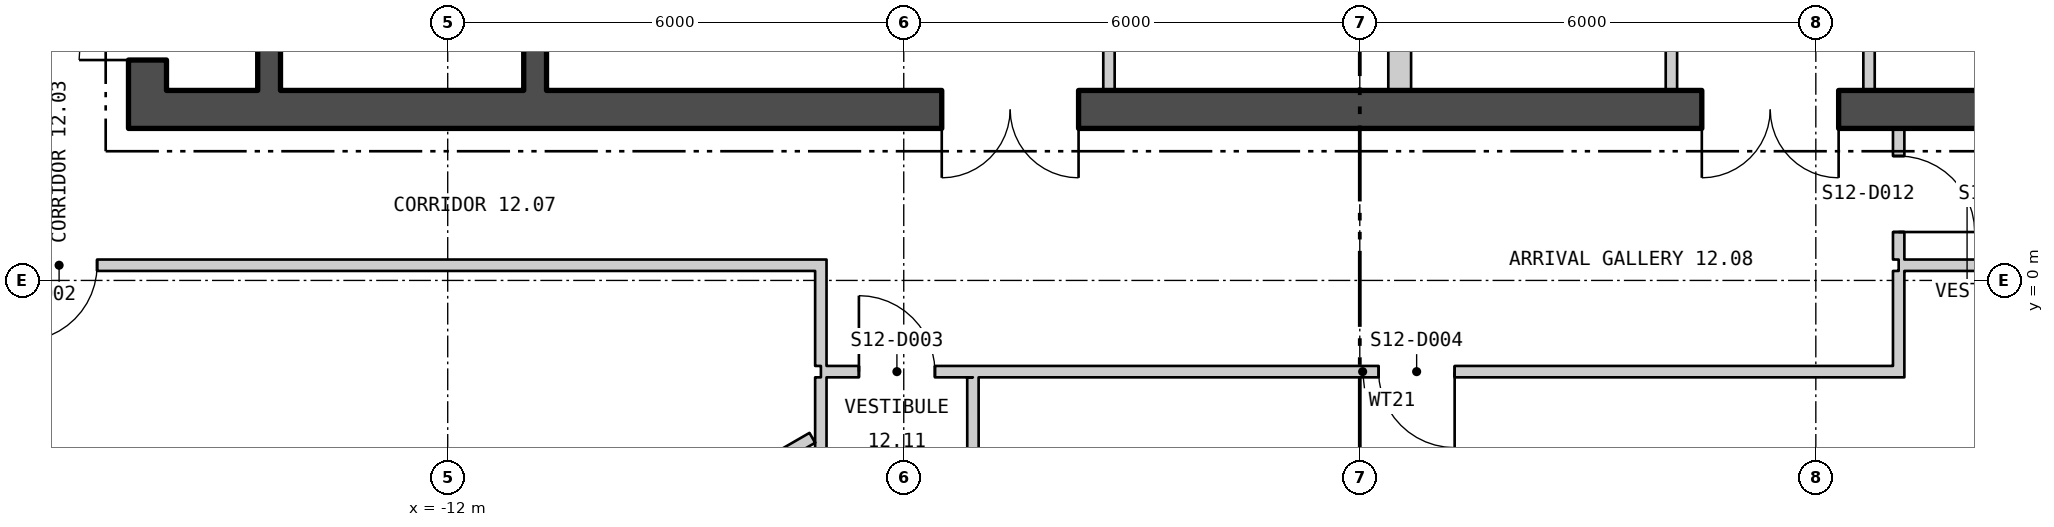
"""IFC4 building model, lengths in metres.
Left out: names, types, materials, properties, quantities, classifications, styles, units other than length and angle.
Written with IfcOpenShell. Run it as: python <this file> out.ifc"""

import sys

from ifc_helpers import new_model, si_unit, direction, frame, frame_2d, origin, place, context, subcontext, project, spatial, polyline, rectangle, outline, extrude, element, fill, save


model = new_model("IFC4")
c1 = context("Model", 3, precision=1e-05, world=origin(), true_north=direction((0.0, 1.0)))
c2 = subcontext(c1, "Body", "Model", "MODEL_VIEW")
j1 = project(units=[si_unit("LENGTHUNIT", "METRE"), si_unit("PLANEANGLEUNIT", "RADIAN")], contexts=[c1])
p1 = place(None, origin())
s1 = spatial("IfcSite", under=j1, at=p1, CompositionType="ELEMENT")
p2 = place(p1, origin())
s2 = spatial("IfcBuilding", under=s1, at=p2, CompositionType="ELEMENT")
p3 = place(p2, frame((0.0, 0.0, 163.2)))
s3 = spatial("IfcBuildingStorey", under=s2, at=p3, CompositionType="ELEMENT", Elevation=163.2)
p4 = place(p3, frame((-26.925, 12.951, -0.18), z_axis=(0.0, 0.0, 1.0), x_axis=(0.499999764979, -0.866025539474, 0.0)))
e1 = element("IfcWall", 1, at=p4, inside=s3, PredefinedType="SOLIDWALL", context=c2, shape_type="SweptSolid", body=[
    extrude(outline(polyline([(-0.13, -0.225), (45.87, -0.225), (45.61, 0.225), (0.13, 0.225), (-0.13, -0.225)])), origin(), (0.0, 0.0, 1.0), 3.68),
])
p5 = place(p4, frame((1.424, 0.0, 1.08)))
e2 = element("IfcOpeningElement", 2, at=p5, cuts=e1, PredefinedType="OPENING", context=c2, shape_type="SweptSolid", body=[
    extrude(rectangle(XDim=2.4, YDim=2.0, at=frame_2d((1.2, 1.0))), frame((0.0, 0.235, 0.0), z_axis=(0.0, -1.0, 0.0), x_axis=(1.0, 0.0, 0.0)), (0.0, 0.0, 1.0), 0.47),
])
p6 = place(p4, frame((5.893, 0.0, 1.08)))
e3 = element("IfcOpeningElement", 3, at=p6, cuts=e1, PredefinedType="OPENING", context=c2, shape_type="SweptSolid", body=[
    extrude(rectangle(XDim=2.4, YDim=2.0, at=frame_2d((1.2, 1.0))), frame((0.0, 0.235, 0.0), z_axis=(0.0, -1.0, 0.0), x_axis=(1.0, 0.0, 0.0)), (0.0, 0.0, 1.0), 0.47),
])
p7 = place(p4, frame((10.401, 0.0, 1.08)))
e4 = element("IfcOpeningElement", 4, at=p7, cuts=e1, PredefinedType="OPENING", context=c2, shape_type="SweptSolid", body=[
    extrude(rectangle(XDim=2.4, YDim=2.0, at=frame_2d((1.2, 1.0))), frame((0.0, 0.235, 0.0), z_axis=(0.0, -1.0, 0.0), x_axis=(1.0, 0.0, 0.0)), (0.0, 0.0, 1.0), 0.47),
])
p8 = place(p4, frame((14.909, 0.0, 1.08)))
e5 = element("IfcOpeningElement", 5, at=p8, cuts=e1, PredefinedType="OPENING", context=c2, shape_type="SweptSolid", body=[
    extrude(rectangle(XDim=2.4, YDim=2.0, at=frame_2d((1.2, 1.0))), frame((0.0, 0.235, 0.0), z_axis=(0.0, -1.0, 0.0), x_axis=(1.0, 0.0, 0.0)), (0.0, 0.0, 1.0), 0.47),
])
p9 = place(p4, frame((19.416, 0.0, 1.08)))
e6 = element("IfcOpeningElement", 6, at=p9, cuts=e1, PredefinedType="OPENING", context=c2, shape_type="SweptSolid", body=[
    extrude(rectangle(XDim=2.4, YDim=2.0, at=frame_2d((1.2, 1.0))), frame((0.0, 0.235, 0.0), z_axis=(0.0, -1.0, 0.0), x_axis=(1.0, 0.0, 0.0)), (0.0, 0.0, 1.0), 0.47),
])
p10 = place(p4, frame((23.924, 0.0, 1.08)))
e7 = element("IfcOpeningElement", 7, at=p10, cuts=e1, PredefinedType="OPENING", context=c2, shape_type="SweptSolid", body=[
    extrude(rectangle(XDim=2.4, YDim=2.0, at=frame_2d((1.2, 1.0))), frame((0.0, 0.235, 0.0), z_axis=(0.0, -1.0, 0.0), x_axis=(1.0, 0.0, 0.0)), (0.0, 0.0, 1.0), 0.47),
])
p11 = place(p4, frame((28.431, 0.0, 1.08)))
e8 = element("IfcOpeningElement", 8, at=p11, cuts=e1, PredefinedType="OPENING", context=c2, shape_type="SweptSolid", body=[
    extrude(rectangle(XDim=2.4, YDim=2.0, at=frame_2d((1.2, 1.0))), frame((0.0, 0.235, 0.0), z_axis=(0.0, -1.0, 0.0), x_axis=(1.0, 0.0, 0.0)), (0.0, 0.0, 1.0), 0.47),
])
p12 = place(p4, frame((32.939, 0.0, 1.08)))
e9 = element("IfcOpeningElement", 9, at=p12, cuts=e1, PredefinedType="OPENING", context=c2, shape_type="SweptSolid", body=[
    extrude(rectangle(XDim=2.4, YDim=2.0, at=frame_2d((1.2, 1.0))), frame((0.0, 0.235, 0.0), z_axis=(0.0, -1.0, 0.0), x_axis=(1.0, 0.0, 0.0)), (0.0, 0.0, 1.0), 0.47),
])
p13 = place(p4, frame((37.447, 0.0, 1.08)))
e10 = element("IfcOpeningElement", 10, at=p13, cuts=e1, PredefinedType="OPENING", context=c2, shape_type="SweptSolid", body=[
    extrude(rectangle(XDim=2.4, YDim=2.0, at=frame_2d((1.2, 1.0))), frame((0.0, 0.235, 0.0), z_axis=(0.0, -1.0, 0.0), x_axis=(1.0, 0.0, 0.0)), (0.0, 0.0, 1.0), 0.47),
])
p14 = place(p4, frame((41.916, 0.0, 1.08)))
e11 = element("IfcOpeningElement", 11, at=p14, cuts=e1, PredefinedType="OPENING", context=c2, shape_type="SweptSolid", body=[
    extrude(rectangle(XDim=2.4, YDim=2.0, at=frame_2d((1.2, 1.0))), frame((0.0, 0.235, 0.0), z_axis=(0.0, -1.0, 0.0), x_axis=(1.0, 0.0, 0.0)), (0.0, 0.0, 1.0), 0.47),
])
p15 = place(p3, frame((4.055, -26.661, -0.18), z_axis=(0.0, 0.0, 1.0), x_axis=(0.499999764979, 0.866025539474, 0.0)))
e12 = element("IfcWall", 12, at=p15, inside=s3, PredefinedType="SOLIDWALL", context=c2, shape_type="SweptSolid", body=[
    extrude(outline(polyline([(-0.13, -0.225), (45.87, -0.225), (45.61, 0.225), (0.13, 0.225), (-0.13, -0.225)])), origin(), (0.0, 0.0, 1.0), 3.68),
])
p16 = place(p15, frame((1.424, 0.0, 1.08)))
e13 = element("IfcOpeningElement", 13, at=p16, cuts=e12, PredefinedType="OPENING", context=c2, shape_type="SweptSolid", body=[
    extrude(rectangle(XDim=2.4, YDim=2.0, at=frame_2d((1.2, 1.0))), frame((0.0, 0.235, 0.0), z_axis=(0.0, -1.0, 0.0), x_axis=(1.0, 0.0, 0.0)), (0.0, 0.0, 1.0), 0.47),
])
p17 = place(p15, frame((5.893, 0.0, 1.08)))
e14 = element("IfcOpeningElement", 14, at=p17, cuts=e12, PredefinedType="OPENING", context=c2, shape_type="SweptSolid", body=[
    extrude(rectangle(XDim=2.4, YDim=2.0, at=frame_2d((1.2, 1.0))), frame((0.0, 0.235, 0.0), z_axis=(0.0, -1.0, 0.0), x_axis=(1.0, 0.0, 0.0)), (0.0, 0.0, 1.0), 0.47),
])
p18 = place(p15, frame((10.401, 0.0, 1.08)))
e15 = element("IfcOpeningElement", 15, at=p18, cuts=e12, PredefinedType="OPENING", context=c2, shape_type="SweptSolid", body=[
    extrude(rectangle(XDim=2.4, YDim=2.0, at=frame_2d((1.2, 1.0))), frame((0.0, 0.235, 0.0), z_axis=(0.0, -1.0, 0.0), x_axis=(1.0, 0.0, 0.0)), (0.0, 0.0, 1.0), 0.47),
])
p19 = place(p15, frame((14.909, 0.0, 1.08)))
e16 = element("IfcOpeningElement", 16, at=p19, cuts=e12, PredefinedType="OPENING", context=c2, shape_type="SweptSolid", body=[
    extrude(rectangle(XDim=2.4, YDim=2.0, at=frame_2d((1.2, 1.0))), frame((0.0, 0.235, 0.0), z_axis=(0.0, -1.0, 0.0), x_axis=(1.0, 0.0, 0.0)), (0.0, 0.0, 1.0), 0.47),
])
p20 = place(p15, frame((19.416, 0.0, 1.08)))
e17 = element("IfcOpeningElement", 17, at=p20, cuts=e12, PredefinedType="OPENING", context=c2, shape_type="SweptSolid", body=[
    extrude(rectangle(XDim=2.4, YDim=2.0, at=frame_2d((1.2, 1.0))), frame((0.0, 0.235, 0.0), z_axis=(0.0, -1.0, 0.0), x_axis=(1.0, 0.0, 0.0)), (0.0, 0.0, 1.0), 0.47),
])
p21 = place(p15, frame((23.924, 0.0, 1.08)))
e18 = element("IfcOpeningElement", 18, at=p21, cuts=e12, PredefinedType="OPENING", context=c2, shape_type="SweptSolid", body=[
    extrude(rectangle(XDim=2.4, YDim=2.0, at=frame_2d((1.2, 1.0))), frame((0.0, 0.235, 0.0), z_axis=(0.0, -1.0, 0.0), x_axis=(1.0, 0.0, 0.0)), (0.0, 0.0, 1.0), 0.47),
])
p22 = place(p15, frame((28.431, 0.0, 1.08)))
e19 = element("IfcOpeningElement", 19, at=p22, cuts=e12, PredefinedType="OPENING", context=c2, shape_type="SweptSolid", body=[
    extrude(rectangle(XDim=2.4, YDim=2.0, at=frame_2d((1.2, 1.0))), frame((0.0, 0.235, 0.0), z_axis=(0.0, -1.0, 0.0), x_axis=(1.0, 0.0, 0.0)), (0.0, 0.0, 1.0), 0.47),
])
p23 = place(p15, frame((32.939, 0.0, 1.08)))
e20 = element("IfcOpeningElement", 20, at=p23, cuts=e12, PredefinedType="OPENING", context=c2, shape_type="SweptSolid", body=[
    extrude(rectangle(XDim=2.4, YDim=2.0, at=frame_2d((1.2, 1.0))), frame((0.0, 0.235, 0.0), z_axis=(0.0, -1.0, 0.0), x_axis=(1.0, 0.0, 0.0)), (0.0, 0.0, 1.0), 0.47),
])
p24 = place(p15, frame((37.447, 0.0, 1.08)))
e21 = element("IfcOpeningElement", 21, at=p24, cuts=e12, PredefinedType="OPENING", context=c2, shape_type="SweptSolid", body=[
    extrude(rectangle(XDim=2.4, YDim=2.0, at=frame_2d((1.2, 1.0))), frame((0.0, 0.235, 0.0), z_axis=(0.0, -1.0, 0.0), x_axis=(1.0, 0.0, 0.0)), (0.0, 0.0, 1.0), 0.47),
])
p25 = place(p15, frame((41.916, 0.0, 1.08)))
e22 = element("IfcOpeningElement", 22, at=p25, cuts=e12, PredefinedType="OPENING", context=c2, shape_type="SweptSolid", body=[
    extrude(rectangle(XDim=2.4, YDim=2.0, at=frame_2d((1.2, 1.0))), frame((0.0, 0.235, 0.0), z_axis=(0.0, -1.0, 0.0), x_axis=(1.0, 0.0, 0.0)), (0.0, 0.0, 1.0), 0.47),
])
p26 = place(p3, frame((-16.2, 2.25, 0.0), z_axis=(0.0, 0.0, 1.0), x_axis=(1.0, 0.0, 0.0)))
e23 = element("IfcWall", 23, at=p26, inside=s3, PredefinedType="SHEAR", context=c2, shape_type="SweptSolid", body=[
    extrude(rectangle(XDim=32.4, YDim=0.5, at=frame_2d((16.2, 0.0))), origin(), (0.0, 0.0, 1.0), 3.7),
])
p27 = place(p26, frame((10.7, 0.0, 0.0)))
e24 = element("IfcOpeningElement", 24, at=p27, cuts=e23, PredefinedType="OPENING", context=c2, shape_type="SweptSolid", body=[
    extrude(rectangle(XDim=1.8, YDim=2.4, at=frame_2d((0.9, 1.2))), frame((0.0, 0.26, 0.0), z_axis=(0.0, -1.0, 0.0), x_axis=(1.0, 0.0, 0.0)), (0.0, 0.0, 1.0), 0.52),
])
p28 = place(p26, frame((20.7, 0.0, 0.0)))
e25 = element("IfcOpeningElement", 25, at=p28, cuts=e23, PredefinedType="OPENING", context=c2, shape_type="SweptSolid", body=[
    extrude(rectangle(XDim=1.8, YDim=2.4, at=frame_2d((0.9, 1.2))), frame((0.0, 0.26, 0.0), z_axis=(0.0, -1.0, 0.0), x_axis=(1.0, 0.0, 0.0)), (0.0, 0.0, 1.0), 0.52),
])
p29 = place(p3, frame((-15.95, 2.5, 0.0), z_axis=(0.0, 0.0, 1.0), x_axis=(0.0, 1.0, 0.0)))
e26 = element("IfcWall", 26, at=p29, inside=s3, PredefinedType="SHEAR", context=c2, shape_type="SweptSolid", body=[
    extrude(rectangle(XDim=15.0, YDim=0.5, at=frame_2d((7.5, 0.0))), origin(), (0.0, 0.0, 1.0), 3.7),
])
p30 = place(p29, frame((4.35, 0.0, 0.0)))
e27 = element("IfcOpeningElement", 27, at=p30, cuts=e26, PredefinedType="OPENING", context=c2, shape_type="SweptSolid", body=[
    extrude(rectangle(XDim=1.5, YDim=2.1, at=frame_2d((0.75, 1.05))), frame((0.0, 0.26, 0.0), z_axis=(0.0, -1.0, 0.0), x_axis=(1.0, 0.0, 0.0)), (0.0, 0.0, 1.0), 0.52),
])
p31 = place(p29, frame((0.4, 0.0, 0.0)))
e28 = element("IfcOpeningElement", 28, at=p31, cuts=e26, PredefinedType="OPENING", context=c2, shape_type="SweptSolid", body=[
    extrude(rectangle(XDim=0.9, YDim=2.1, at=frame_2d((0.45, 1.05))), frame((0.0, 0.26, 0.0), z_axis=(0.0, -1.0, 0.0), x_axis=(1.0, 0.0, 0.0)), (0.0, 0.0, 1.0), 0.52),
])
p32 = place(p29, frame((2.491, 0.0, 0.0)))
e29 = element("IfcOpeningElement", 29, at=p32, cuts=e26, PredefinedType="OPENING", context=c2, shape_type="SweptSolid", body=[
    extrude(rectangle(XDim=0.9, YDim=2.1, at=frame_2d((0.45, 1.05))), frame((0.0, 0.26, 0.0), z_axis=(0.0, -1.0, 0.0), x_axis=(1.0, 0.0, 0.0)), (0.0, 0.0, 1.0), 0.52),
])
p33 = place(p29, frame((7.996, 0.0, 0.0)))
e30 = element("IfcOpeningElement", 30, at=p33, cuts=e26, PredefinedType="OPENING", context=c2, shape_type="SweptSolid", body=[
    extrude(rectangle(XDim=1.0, YDim=2.1, at=frame_2d((0.5, 1.05))), frame((0.0, 0.26, 0.0), z_axis=(0.0, -1.0, 0.0), x_axis=(1.0, 0.0, 0.0)), (0.0, 0.0, 1.0), 0.52),
])
p34 = place(p29, frame((12.621, 0.0, 0.0)))
e31 = element("IfcOpeningElement", 31, at=p34, cuts=e26, PredefinedType="OPENING", context=c2, shape_type="SweptSolid", body=[
    extrude(rectangle(XDim=0.9, YDim=2.1, at=frame_2d((0.45, 1.05))), frame((0.0, 0.26, 0.0), z_axis=(0.0, -1.0, 0.0), x_axis=(1.0, 0.0, 0.0)), (0.0, 0.0, 1.0), 0.52),
])
p35 = place(p3, frame((-10.85, 2.5, 0.0), z_axis=(0.0, 0.0, 1.0), x_axis=(0.0, 1.0, 0.0)))
e32 = element("IfcWall", 32, at=p35, inside=s3, PredefinedType="SHEAR", context=c2, shape_type="SweptSolid", body=[
    extrude(rectangle(XDim=15.0, YDim=0.3, at=frame_2d((7.5, 0.0))), origin(), (0.0, 0.0, 1.0), 3.7),
])
p36 = place(p35, frame((3.475, 0.0, 0.0)))
e33 = element("IfcOpeningElement", 33, at=p36, cuts=e32, PredefinedType="OPENING", context=c2, shape_type="SweptSolid", body=[
    extrude(rectangle(XDim=1.25, YDim=2.1, at=frame_2d((0.625, 1.05))), frame((0.0, 0.16, 0.0), z_axis=(0.0, -1.0, 0.0), x_axis=(1.0, 0.0, 0.0)), (0.0, 0.0, 1.0), 0.32),
])
p37 = place(p35, frame((1.125, 0.0, 0.0)))
e34 = element("IfcOpeningElement", 34, at=p37, cuts=e32, PredefinedType="OPENING", context=c2, shape_type="SweptSolid", body=[
    extrude(rectangle(XDim=1.0, YDim=2.1, at=frame_2d((0.5, 1.05))), frame((0.0, 0.16, 0.0), z_axis=(0.0, -1.0, 0.0), x_axis=(1.0, 0.0, 0.0)), (0.0, 0.0, 1.0), 0.32),
])
p38 = place(p3, frame((-14.35, 2.5, 0.0), z_axis=(0.0, 0.0, 1.0), x_axis=(0.0, 1.0, 0.0)))
e35 = element("IfcWall", 35, at=p38, inside=s3, PredefinedType="SHEAR", context=c2, shape_type="SweptSolid", body=[
    extrude(rectangle(XDim=15.0, YDim=0.3, at=frame_2d((7.5, 0.0))), origin(), (0.0, 0.0, 1.0), 3.7),
])
p39 = place(p38, frame((4.35, 0.0, 0.0)))
e36 = element("IfcOpeningElement", 36, at=p39, cuts=e35, PredefinedType="OPENING", context=c2, shape_type="SweptSolid", body=[
    extrude(rectangle(XDim=1.5, YDim=2.1, at=frame_2d((0.75, 1.05))), frame((0.0, 0.16, 0.0), z_axis=(0.0, -1.0, 0.0), x_axis=(1.0, 0.0, 0.0)), (0.0, 0.0, 1.0), 0.32),
])
for number, where, z_axis, x_axis in (
    (37, (-3.3, 2.5, 0.0), (0.0, 0.0, 1.0), (0.0, 1.0, 0.0)),
    (38, (0.45, 2.5, 0.0), (0.0, 0.0, 1.0), (0.0, 1.0, 0.0)),
    (39, (0.6, 2.5, 0.0), (0.0, 0.0, 1.0), (0.0, 1.0, 0.0)),
    (40, (4.1, 2.5, 0.0), (0.0, 0.0, 1.0), (0.0, 1.0, 0.0)),
    (41, (6.7, 2.5, 0.0), (0.0, 0.0, 1.0), (0.0, 1.0, 0.0)),
):
    element("IfcWall", number, at=place(p3, frame(where, z_axis=z_axis, x_axis=x_axis)), inside=s3, PredefinedType="PARTITIONING", context=c2, shape_type="SweptSolid", body=[
        extrude(rectangle(XDim=3.575, YDim=0.15, at=frame_2d((1.788, 0.0))), origin(), (0.0, 0.0, 1.0), 3.7),
    ])
p40 = place(p3, frame((-17.925, 0.2, 0.0), z_axis=(0.0, 0.0, 1.0), x_axis=(1.0, 0.0, 0.0)))
e42 = element("IfcWall", 42, at=p40, inside=s3, PredefinedType="PARTITIONING", context=c2, shape_type="SweptSolid", body=[
    extrude(rectangle(XDim=10.759, YDim=0.15, at=frame_2d((5.38, 0.0))), origin(), (0.0, 0.0, 1.0), 3.7),
])
p41 = place(p40, frame((0.312, 0.0, 0.0)))
e43 = element("IfcOpeningElement", 43, at=p41, cuts=e42, PredefinedType="OPENING", context=c2, shape_type="SweptSolid", body=[
    extrude(rectangle(XDim=1.0, YDim=2.1, at=frame_2d((0.5, 1.05))), frame((0.0, 0.085, 0.0), z_axis=(0.0, -1.0, 0.0), x_axis=(1.0, 0.0, 0.0)), (0.0, 0.0, 1.0), 0.17),
])
p42 = place(p3, frame((-14.906, -6.516, 0.0), z_axis=(0.0, 0.0, 1.0), x_axis=(0.866138783521, 0.499803569096, 0.0)))
e44 = element("IfcWall", 44, at=p42, inside=s3, PredefinedType="PARTITIONING", context=c2, shape_type="SweptSolid", body=[
    extrude(rectangle(XDim=8.893, YDim=0.15, at=frame_2d((4.447, 0.0))), origin(), (0.0, 0.0, 1.0), 3.7),
])
p43 = place(p3, frame((-7.091, -1.125, 0.0), z_axis=(0.0, 0.0, 1.0), x_axis=(0.0, 1.0, 0.0)))
e45 = element("IfcWall", 45, at=p43, inside=s3, PredefinedType="PARTITIONING", context=c2, shape_type="SweptSolid", body=[
    extrude(rectangle(XDim=1.4, YDim=0.15, at=frame_2d((0.7, 0.0))), origin(), (0.0, 0.0, 1.0), 3.7),
])
p44 = place(p3, frame((-7.09, -1.2, 0.0), z_axis=(0.0, 0.0, 1.0), x_axis=(1.0, 0.0, 0.0)))
e46 = element("IfcWall", 46, at=p44, inside=s3, PredefinedType="PARTITIONING", context=c2, shape_type="SweptSolid", body=[
    extrude(rectangle(XDim=14.255, YDim=0.15, at=frame_2d((7.128, 0.0))), origin(), (0.0, 0.0, 1.0), 3.7),
])
p45 = place(p44, frame((0.5, 0.0, 0.0)))
e47 = element("IfcOpeningElement", 47, at=p45, cuts=e46, PredefinedType="OPENING", context=c2, shape_type="SweptSolid", body=[
    extrude(rectangle(XDim=1.0, YDim=2.1, at=frame_2d((0.5, 1.05))), frame((0.0, 0.085, 0.0), z_axis=(0.0, -1.0, 0.0), x_axis=(1.0, 0.0, 0.0)), (0.0, 0.0, 1.0), 0.17),
])
p46 = place(p44, frame((7.338, 0.0, 0.0)))
e48 = element("IfcOpeningElement", 48, at=p46, cuts=e46, PredefinedType="OPENING", context=c2, shape_type="SweptSolid", body=[
    extrude(rectangle(XDim=1.0, YDim=2.1, at=frame_2d((0.5, 1.05))), frame((0.0, 0.085, 0.0), z_axis=(0.0, -1.0, 0.0), x_axis=(1.0, 0.0, 0.0)), (0.0, 0.0, 1.0), 0.17),
])
p47 = place(p3, frame((-7.091, -3.46, 0.0), z_axis=(0.0, 0.0, 1.0), x_axis=(-9.153318e-05, 0.999999995811, 0.0)))
e49 = element("IfcWall", 49, at=p47, inside=s3, PredefinedType="PARTITIONING", context=c2, shape_type="SweptSolid", body=[
    extrude(rectangle(XDim=2.185, YDim=0.15, at=frame_2d((1.093, 0.0))), origin(), (0.0, 0.0, 1.0), 3.7),
])
p48 = place(p3, frame((-5.089, -3.48, 0.0), z_axis=(0.0, 0.0, 1.0), x_axis=(-0.000453514693, 0.999999897162, 0.0)))
e50 = element("IfcWall", 50, at=p48, inside=s3, PredefinedType="PARTITIONING", context=c2, shape_type="SweptSolid", body=[
    extrude(rectangle(XDim=2.205, YDim=0.15, at=frame_2d((1.103, 0.0))), origin(), (0.0, 0.0, 1.0), 3.7),
])
p49 = place(p3, frame((7.09, -1.125, 0.0), z_axis=(0.0, 0.0, 1.0), x_axis=(0.0, 1.0, 0.0)))
e51 = element("IfcWall", 51, at=p49, inside=s3, PredefinedType="PARTITIONING", context=c2, shape_type="SweptSolid", body=[
    extrude(rectangle(XDim=1.25, YDim=0.15, at=frame_2d((0.625, 0.0))), origin(), (0.0, 0.0, 1.0), 3.7),
])
p50 = place(p3, frame((7.09, 0.2, 0.0), z_axis=(0.0, 0.0, 1.0), x_axis=(1.0, 0.0, 0.0)))
e52 = element("IfcWall", 52, at=p50, inside=s3, PredefinedType="PARTITIONING", context=c2, shape_type="SweptSolid", body=[
    extrude(rectangle(XDim=10.835, YDim=0.15, at=frame_2d((5.418, 0.0))), origin(), (0.0, 0.0, 1.0), 3.7),
])
p51 = place(p3, frame((7.09, 0.275, 0.0), z_axis=(0.0, 0.0, 1.0), x_axis=(0.0, 1.0, 0.0)))
e53 = element("IfcWall", 53, at=p51, inside=s3, PredefinedType="PARTITIONING", context=c2, shape_type="SweptSolid", body=[
    extrude(rectangle(XDim=1.725, YDim=0.15, at=frame_2d((0.863, 0.0))), origin(), (0.0, 0.0, 1.0), 3.7),
])
p52 = place(p51, frame((0.362, 0.0, 0.0)))
e54 = element("IfcOpeningElement", 54, at=p52, cuts=e53, PredefinedType="OPENING", context=c2, shape_type="SweptSolid", body=[
    extrude(rectangle(XDim=1.0, YDim=2.1, at=frame_2d((0.5, 1.05))), frame((0.0, 0.085, 0.0), z_axis=(0.0, -1.0, 0.0), x_axis=(1.0, 0.0, 0.0)), (0.0, 0.0, 1.0), 0.17),
])
p53 = place(p31, origin())
e55 = element("IfcDoor", 55, at=p53, inside=s3, OperationType="SINGLE_SWING_RIGHT", PredefinedType="DOOR", context=c2, shape_type="SweptSolid", body=[
    extrude(rectangle(XDim=0.9, YDim=2.1, at=frame_2d((0.45, 1.05))), frame((0.0, 0.025, 0.0), z_axis=(0.0, -1.0, 0.0), x_axis=(1.0, 0.0, 0.0)), (0.0, 0.0, 1.0), 0.05),
])
fill(e28, e55)
p54 = place(p27, origin())
e56 = element("IfcDoor", 56, at=p54, inside=s3, OperationType="DOUBLE_DOOR_SINGLE_SWING", PredefinedType="DOOR", context=c2, shape_type="SweptSolid", body=[
    extrude(rectangle(XDim=1.8, YDim=2.4, at=frame_2d((0.9, 1.2))), frame((0.0, 0.025, 0.0), z_axis=(0.0, -1.0, 0.0), x_axis=(1.0, 0.0, 0.0)), (0.0, 0.0, 1.0), 0.05),
])
fill(e24, e56)
p55 = place(p28, origin())
e57 = element("IfcDoor", 57, at=p55, inside=s3, OperationType="DOUBLE_DOOR_SINGLE_SWING", PredefinedType="DOOR", context=c2, shape_type="SweptSolid", body=[
    extrude(rectangle(XDim=1.8, YDim=2.4, at=frame_2d((0.9, 1.2))), frame((0.0, 0.025, 0.0), z_axis=(0.0, -1.0, 0.0), x_axis=(1.0, 0.0, 0.0)), (0.0, 0.0, 1.0), 0.05),
])
fill(e25, e57)
p56 = place(p41, origin())
e58 = element("IfcDoor", 58, at=p56, inside=s3, OperationType="SINGLE_SWING_LEFT", PredefinedType="DOOR", context=c2, shape_type="SweptSolid", body=[
    extrude(rectangle(XDim=1.0, YDim=2.1, at=frame_2d((0.5, 1.05))), frame((0.0, 0.025, 0.0), z_axis=(0.0, -1.0, 0.0), x_axis=(1.0, 0.0, 0.0)), (0.0, 0.0, 1.0), 0.05),
])
fill(e43, e58)
p57 = place(p45, origin())
e59 = element("IfcDoor", 59, at=p57, inside=s3, OperationType="SINGLE_SWING_RIGHT", PredefinedType="DOOR", context=c2, shape_type="SweptSolid", body=[
    extrude(rectangle(XDim=1.0, YDim=2.1, at=frame_2d((0.5, 1.05))), frame((0.0, 0.025, 0.0), z_axis=(0.0, -1.0, 0.0), x_axis=(1.0, 0.0, 0.0)), (0.0, 0.0, 1.0), 0.05),
])
fill(e47, e59)
p58 = place(p46, origin())
e60 = element("IfcDoor", 60, at=p58, inside=s3, OperationType="SINGLE_SWING_RIGHT", PredefinedType="DOOR", context=c2, shape_type="SweptSolid", body=[
    extrude(rectangle(XDim=1.0, YDim=2.1, at=frame_2d((0.5, 1.05))), frame((0.0, 0.025, 0.0), z_axis=(0.0, -1.0, 0.0), x_axis=(1.0, 0.0, 0.0)), (0.0, 0.0, 1.0), 0.05),
])
fill(e48, e60)
p59 = place(p52, origin())
e61 = element("IfcDoor", 61, at=p59, inside=s3, OperationType="SINGLE_SWING_LEFT", PredefinedType="DOOR", context=c2, shape_type="SweptSolid", body=[
    extrude(rectangle(XDim=1.0, YDim=2.1, at=frame_2d((0.5, 1.05))), frame((0.0, 0.025, 0.0), z_axis=(0.0, -1.0, 0.0), x_axis=(1.0, 0.0, 0.0)), (0.0, 0.0, 1.0), 0.05),
])
fill(e54, e61)
save(model, sys.argv[1])
